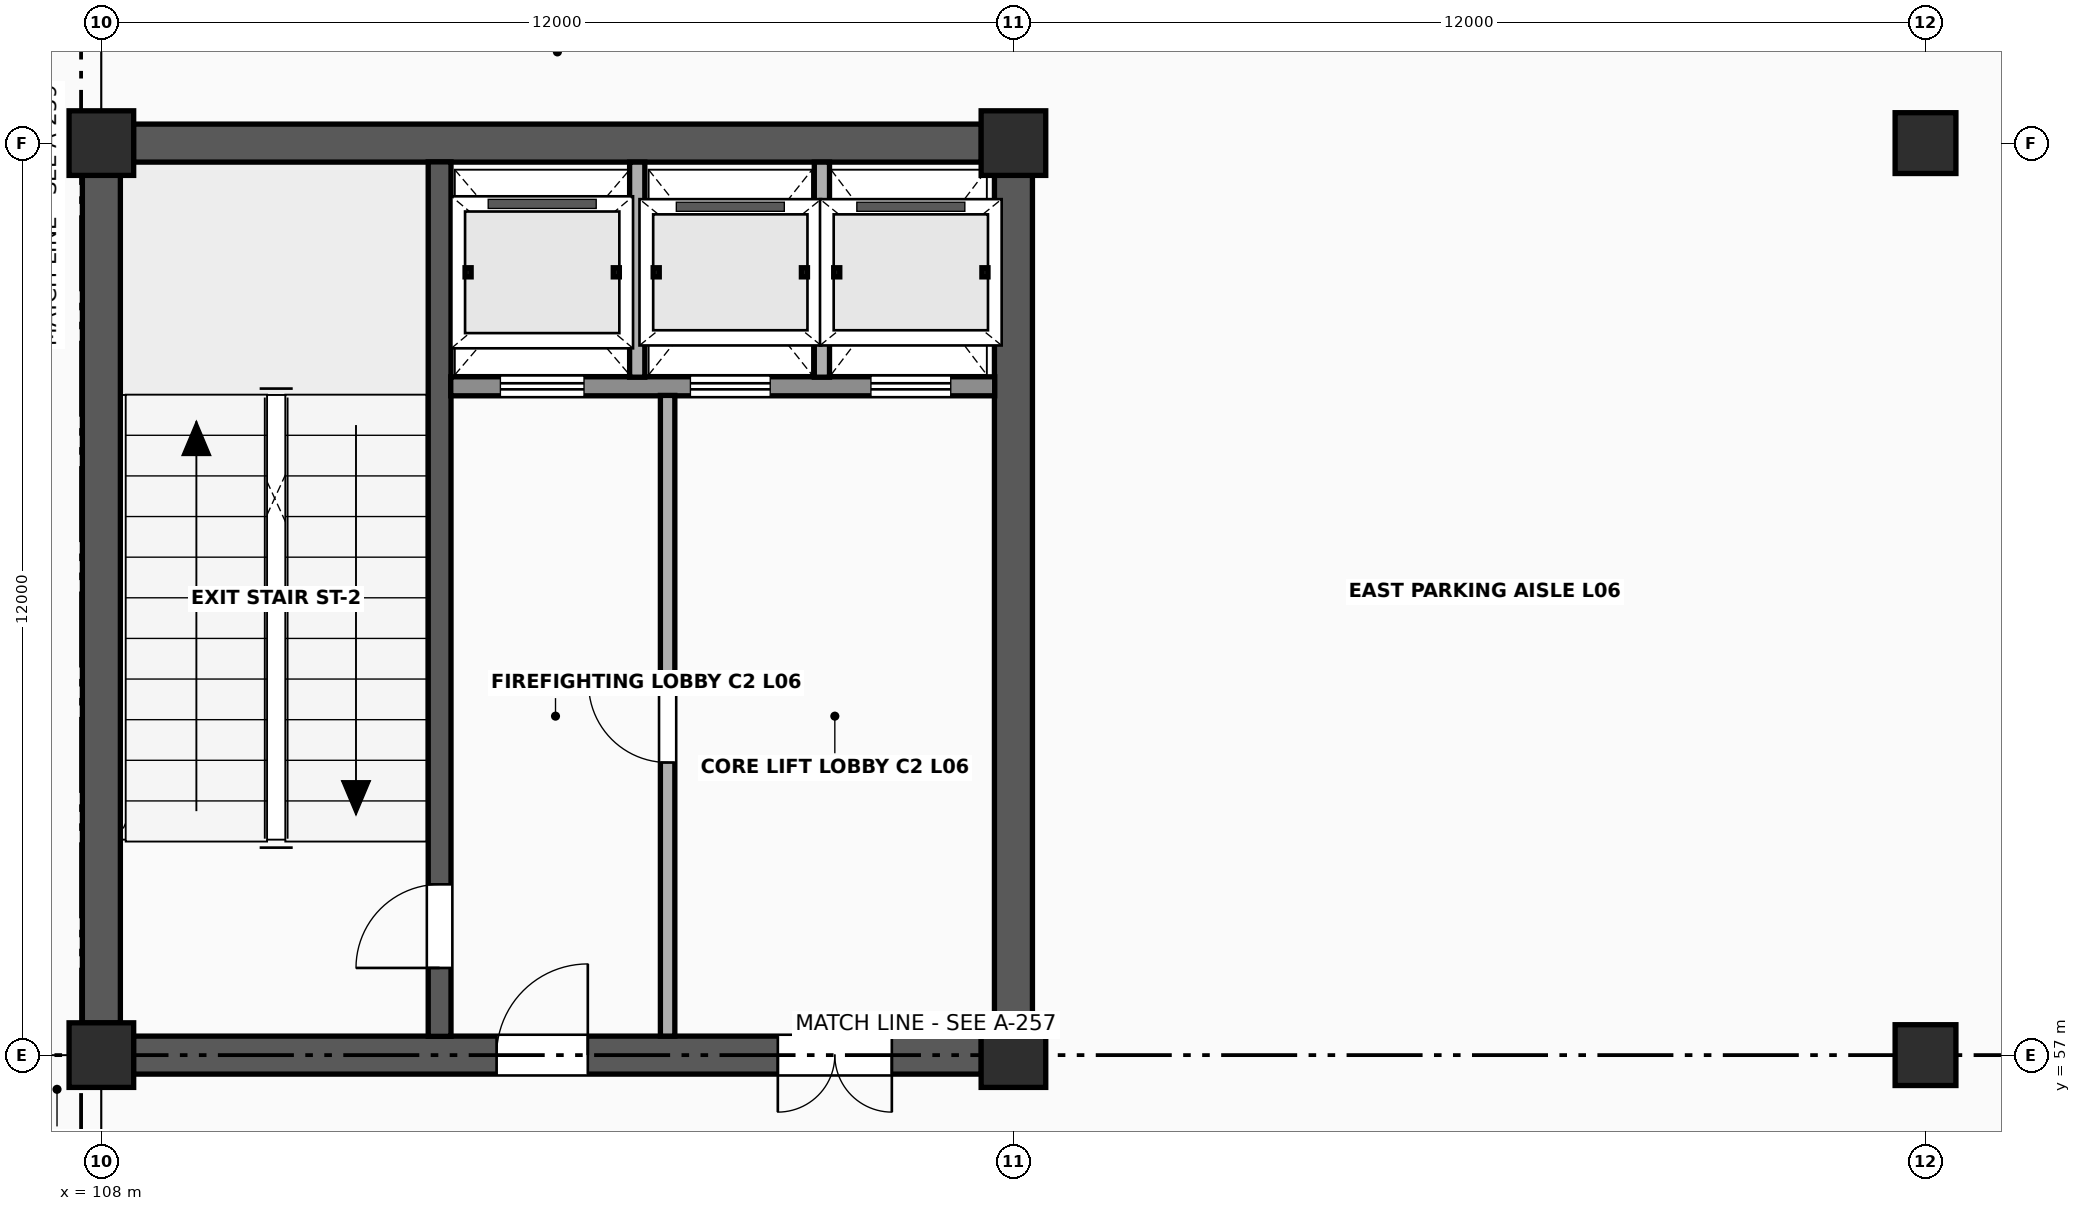
"""IFC4 building model, lengths in metres.
Left out: names, types, materials, properties, quantities, classifications, styles, units other than length and angle.
Written with IfcOpenShell. Run it as: python <this file> out.ifc"""

import sys

from ifc_helpers import new_model, si_unit, direction, frame, frame_2d, origin, origin_2d, place, context, subcontext, project, spatial, rectangle, extrude, element, fill, save


model = new_model("IFC4")
c1 = context("Model", 3, precision=1e-05, world=origin(), true_north=direction((0.0, 1.0)))
c2 = subcontext(c1, "Body", "Model", "MODEL_VIEW")
j1 = project(units=[si_unit("LENGTHUNIT", "METRE"), si_unit("PLANEANGLEUNIT", "RADIAN")], contexts=[c1])
p1 = place(None, origin())
s1 = spatial("IfcSite", under=j1, at=p1, CompositionType="ELEMENT")
p2 = place(p1, origin())
s2 = spatial("IfcBuilding", under=s1, at=p2, CompositionType="ELEMENT")
p3 = place(p2, frame((0.0, 0.0, 24.8)))
s3 = spatial("IfcBuildingStorey", under=s2, at=p3, CompositionType="ELEMENT", Elevation=24.8)
for number, where, z_axis, x_axis in (
    (1, (108.0, 57.0, 0.0), (0.0, 0.0, 1.0), (1.0, 0.0, 0.0)),
    (2, (108.0, 69.0, 0.0), (0.0, 0.0, 1.0), (1.0, 0.0, 0.0)),
    (3, (120.0, 57.0, 0.0), (0.0, 0.0, 1.0), (1.0, 0.0, 0.0)),
    (4, (120.0, 69.0, 0.0), (0.0, 0.0, 1.0), (1.0, 0.0, 0.0)),
):
    element("IfcColumn", number, at=place(p3, frame(where, z_axis=z_axis, x_axis=x_axis)), inside=s3, PredefinedType="COLUMN", context=c2, shape_type="SweptSolid", body=[
        extrude(rectangle(XDim=0.85, YDim=0.85, at=origin_2d()), origin(), (0.0, 0.0, 1.0), 3.8),
    ])
for number, where, z_axis, x_axis in (
    (5, (132.0, 57.0, 0.0), (0.0, 0.0, 1.0), (1.0, 0.0, 0.0)),
    (6, (132.0, 69.0, 0.0), (0.0, 0.0, 1.0), (1.0, 0.0, 0.0)),
):
    element("IfcColumn", number, at=place(p3, frame(where, z_axis=z_axis, x_axis=x_axis)), inside=s3, PredefinedType="COLUMN", context=c2, shape_type="SweptSolid", body=[
        extrude(rectangle(XDim=0.8, YDim=0.8, at=origin_2d()), origin(), (0.0, 0.0, 1.0), 3.8),
    ])
p4 = place(p3, frame((108.422, 57.0, 0.0), z_axis=(0.0, 0.0, 1.0), x_axis=(1.0, 0.0, 0.0)))
e7 = element("IfcWall", 7, at=p4, inside=s3, PredefinedType="SHEAR", context=c2, shape_type="SweptSolid", body=[
    extrude(rectangle(XDim=11.156, YDim=0.5, at=frame_2d((5.578, 0.0))), origin(), (0.0, 0.0, 1.0), 3.628),
])
p5 = place(p4, frame((4.778, 0.0, 0.0)))
e8 = element("IfcOpeningElement", 8, at=p5, cuts=e7, PredefinedType="OPENING", context=c2, shape_type="SweptSolid", body=[
    extrude(rectangle(XDim=1.2, YDim=2.2, at=frame_2d((0.6, 1.1))), frame((0.0, 0.265, 0.0), z_axis=(0.0, -1.0, 0.0), x_axis=(1.0, 0.0, 0.0)), (0.0, 0.0, 1.0), 0.53),
])
p6 = place(p4, frame((8.478, 0.0, 0.0)))
e9 = element("IfcOpeningElement", 9, at=p6, cuts=e7, PredefinedType="OPENING", context=c2, shape_type="SweptSolid", body=[
    extrude(rectangle(XDim=1.5, YDim=2.25, at=frame_2d((0.75, 1.125))), frame((0.0, 0.265, 0.0), z_axis=(0.0, -1.0, 0.0), x_axis=(1.0, 0.0, 0.0)), (0.0, 0.0, 1.0), 0.53),
])
for number, where, z_axis, x_axis in (
    (10, (108.422, 69.0, 0.0), (0.0, 0.0, 1.0), (1.0, 0.0, 0.0)),
    (11, (108.0, 57.422, 0.0), (0.0, 0.0, 1.0), (0.0, 1.0, 0.0)),
    (12, (120.0, 57.422, 0.0), (0.0, 0.0, 1.0), (0.0, 1.0, 0.0)),
):
    element("IfcWall", number, at=place(p3, frame(where, z_axis=z_axis, x_axis=x_axis)), inside=s3, PredefinedType="SHEAR", context=c2, shape_type="SweptSolid", body=[
        extrude(rectangle(XDim=11.156, YDim=0.5, at=frame_2d((5.578, 0.0))), origin(), (0.0, 0.0, 1.0), 3.628),
    ])
p7 = place(p3, frame((112.45, 57.247, 0.0), z_axis=(0.0, 0.0, 1.0), x_axis=(0.0, 1.0, 0.0)))
e13 = element("IfcWall", 13, at=p7, inside=s3, PredefinedType="SHEAR", context=c2, shape_type="SweptSolid", body=[
    extrude(rectangle(XDim=11.506, YDim=0.3, at=frame_2d((5.753, 0.0))), origin(), (0.0, 0.0, 1.0), 3.628),
])
p8 = place(p7, frame((0.9, 0.0, 0.0)))
e14 = element("IfcOpeningElement", 14, at=p8, cuts=e13, PredefinedType="OPENING", context=c2, shape_type="SweptSolid", body=[
    extrude(rectangle(XDim=1.1, YDim=2.2, at=frame_2d((0.55, 1.1))), frame((0.0, 0.165, 0.0), z_axis=(0.0, -1.0, 0.0), x_axis=(1.0, 0.0, 0.0)), (0.0, 0.0, 1.0), 0.33),
])
p9 = place(p3, frame((112.597, 65.8, 0.0), z_axis=(0.0, 0.0, 1.0), x_axis=(1.0, 0.0, 0.0)))
e15 = element("IfcWall", 15, at=p9, inside=s3, PredefinedType="SOLIDWALL", context=c2, shape_type="SweptSolid", body=[
    extrude(rectangle(XDim=7.156, YDim=0.25, at=frame_2d((3.578, 0.0))), origin(), (0.0, 0.0, 1.0), 3.628),
])
p10 = place(p9, frame((0.653, 0.0, 0.0)))
e16 = element("IfcOpeningElement", 16, at=p10, cuts=e15, PredefinedType="OPENING", context=c2, shape_type="SweptSolid", body=[
    extrude(rectangle(XDim=1.1, YDim=2.24, at=frame_2d((0.55, 1.12))), frame((0.0, 0.14, 0.0), z_axis=(0.0, -1.0, 0.0), x_axis=(1.0, 0.0, 0.0)), (0.0, 0.0, 1.0), 0.28),
])
p11 = place(p9, frame((3.153, 0.0, 0.0)))
e17 = element("IfcOpeningElement", 17, at=p11, cuts=e15, PredefinedType="OPENING", context=c2, shape_type="SweptSolid", body=[
    extrude(rectangle(XDim=1.05, YDim=2.2, at=frame_2d((0.525, 1.1))), frame((0.0, 0.14, 0.0), z_axis=(0.0, -1.0, 0.0), x_axis=(1.0, 0.0, 0.0)), (0.0, 0.0, 1.0), 0.28),
])
p12 = place(p9, frame((5.528, 0.0, 0.0)))
e18 = element("IfcOpeningElement", 18, at=p12, cuts=e15, PredefinedType="OPENING", context=c2, shape_type="SweptSolid", body=[
    extrude(rectangle(XDim=1.05, YDim=2.2, at=frame_2d((0.525, 1.1))), frame((0.0, 0.14, 0.0), z_axis=(0.0, -1.0, 0.0), x_axis=(1.0, 0.0, 0.0)), (0.0, 0.0, 1.0), 0.28),
])
for number, where, z_axis, x_axis in (
    (19, (115.05, 65.92, 0.0), (0.0, 0.0, 1.0), (0.0, 1.0, 0.0)),
    (20, (117.48, 65.92, 0.0), (0.0, 0.0, 1.0), (0.0, 1.0, 0.0)),
):
    element("IfcWall", number, at=place(p3, frame(where, z_axis=z_axis, x_axis=x_axis)), inside=s3, PredefinedType="SOLIDWALL", context=c2, shape_type="SweptSolid", body=[
        extrude(rectangle(XDim=2.83, YDim=0.2, at=frame_2d((1.415, 0.0))), origin(), (0.0, 0.0, 1.0), 3.618),
    ])
p13 = place(p3, frame((115.45, 57.25, 0.0), z_axis=(0.0, 0.0, 1.0), x_axis=(0.0, 1.0, 0.0)))
e21 = element("IfcWall", 21, at=p13, inside=s3, PredefinedType="SOLIDWALL", context=c2, shape_type="SweptSolid", body=[
    extrude(rectangle(XDim=8.43, YDim=0.19, at=frame_2d((4.215, 0.0))), origin(), (0.0, 0.0, 1.0), 3.618),
])
p14 = place(p13, frame((3.6, 0.0, 0.0)))
e22 = element("IfcOpeningElement", 22, at=p14, cuts=e21, PredefinedType="OPENING", context=c2, shape_type="SweptSolid", body=[
    extrude(rectangle(XDim=1.04, YDim=2.18, at=frame_2d((0.52, 1.09))), frame((0.0, 0.11, 0.0), z_axis=(0.0, -1.0, 0.0), x_axis=(1.0, 0.0, 0.0)), (0.0, 0.0, 1.0), 0.22),
])
p15 = place(p8, origin())
e23 = element("IfcDoor", 23, at=p15, inside=s3, OperationType="SINGLE_SWING_LEFT", PredefinedType="DOOR", context=c2, shape_type="SweptSolid", body=[
    extrude(rectangle(XDim=1.1, YDim=2.2, at=frame_2d((0.55, 1.1))), frame((0.0, 0.025, 0.0), z_axis=(0.0, -1.0, 0.0), x_axis=(1.0, 0.0, 0.0)), (0.0, 0.0, 1.0), 0.05),
])
fill(e14, e23)
p16 = place(p14, origin())
e24 = element("IfcDoor", 24, at=p16, inside=s3, OperationType="SINGLE_SWING_RIGHT", PredefinedType="DOOR", context=c2, shape_type="SweptSolid", body=[
    extrude(rectangle(XDim=1.04, YDim=2.18, at=frame_2d((0.52, 1.09))), frame((0.0, 0.025, 0.0), z_axis=(0.0, -1.0, 0.0), x_axis=(1.0, 0.0, 0.0)), (0.0, 0.0, 1.0), 0.05),
])
fill(e22, e24)
p17 = place(p5, origin())
e25 = element("IfcDoor", 25, at=p17, inside=s3, OperationType="SINGLE_SWING_RIGHT", PredefinedType="DOOR", context=c2, shape_type="SweptSolid", body=[
    extrude(rectangle(XDim=1.2, YDim=2.2, at=frame_2d((0.6, 1.1))), frame((0.0, 0.025, 0.0), z_axis=(0.0, -1.0, 0.0), x_axis=(1.0, 0.0, 0.0)), (0.0, 0.0, 1.0), 0.05),
])
fill(e8, e25)
p18 = place(p6, origin())
e26 = element("IfcDoor", 26, at=p18, inside=s3, OperationType="DOUBLE_DOOR_SINGLE_SWING", PredefinedType="DOOR", context=c2, shape_type="SweptSolid", body=[
    extrude(rectangle(XDim=1.5, YDim=2.25, at=frame_2d((0.75, 1.125))), frame((0.0, 0.025, 0.0), z_axis=(0.0, -1.0, 0.0), x_axis=(1.0, 0.0, 0.0)), (0.0, 0.0, 1.0), 0.05),
])
fill(e9, e26)
p19 = place(p10, origin())
e27 = element("IfcDoor", 27, at=p19, inside=s3, OperationType="SLIDING_TO_LEFT", PredefinedType="USERDEFINED", context=c2, shape_type="SweptSolid", body=[
    extrude(rectangle(XDim=1.1, YDim=2.24, at=frame_2d((0.55, 1.12))), frame((0.0, 0.025, 0.0), z_axis=(0.0, -1.0, 0.0), x_axis=(1.0, 0.0, 0.0)), (0.0, 0.0, 1.0), 0.05),
])
fill(e16, e27)
p20 = place(p11, origin())
e28 = element("IfcDoor", 28, at=p20, inside=s3, OperationType="SLIDING_TO_LEFT", PredefinedType="USERDEFINED", context=c2, shape_type="SweptSolid", body=[
    extrude(rectangle(XDim=1.05, YDim=2.2, at=frame_2d((0.525, 1.1))), frame((0.0, 0.025, 0.0), z_axis=(0.0, -1.0, 0.0), x_axis=(1.0, 0.0, 0.0)), (0.0, 0.0, 1.0), 0.05),
])
fill(e17, e28)
p21 = place(p12, origin())
e29 = element("IfcDoor", 29, at=p21, inside=s3, OperationType="SLIDING_TO_LEFT", PredefinedType="USERDEFINED", context=c2, shape_type="SweptSolid", body=[
    extrude(rectangle(XDim=1.05, YDim=2.2, at=frame_2d((0.525, 1.1))), frame((0.0, 0.025, 0.0), z_axis=(0.0, -1.0, 0.0), x_axis=(1.0, 0.0, 0.0)), (0.0, 0.0, 1.0), 0.05),
])
fill(e18, e29)
save(model, sys.argv[1])
